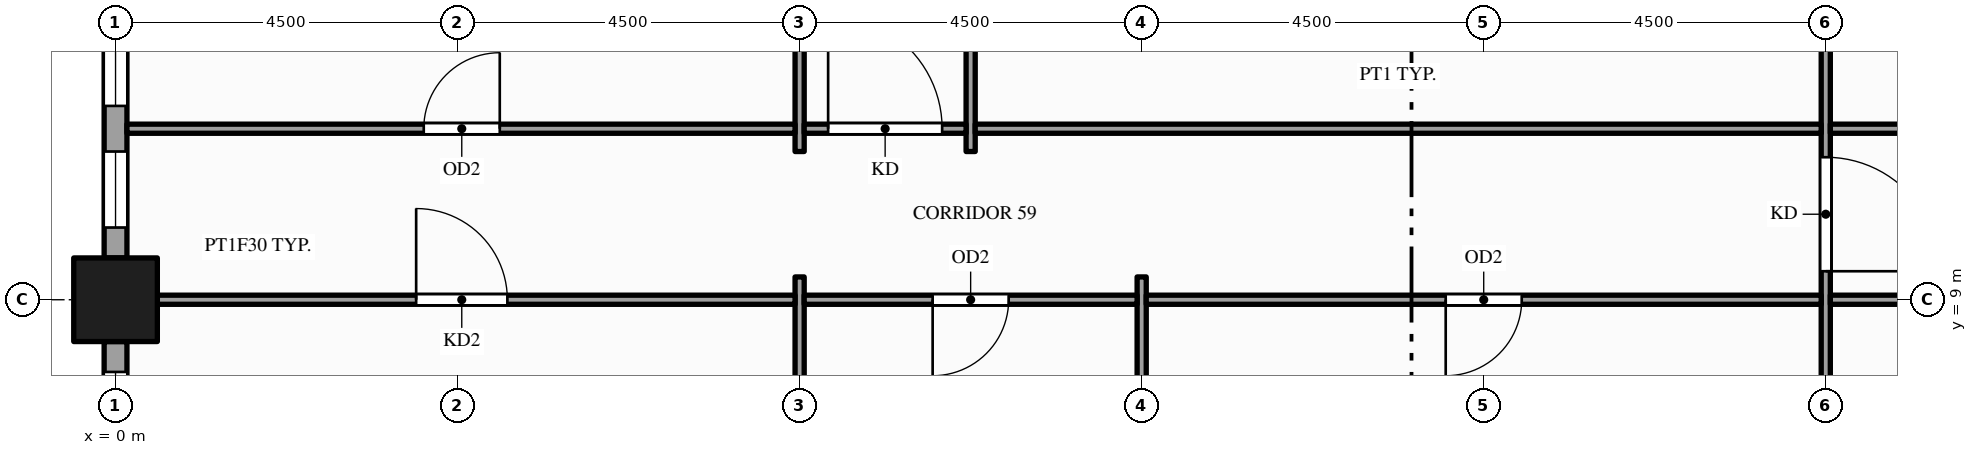
"""IFC4 building model, lengths in metres.
Left out: names, types, materials, properties, quantities, classifications, styles, units other than length and angle.
Written with IfcOpenShell. Run it as: python <this file> out.ifc"""

import sys

from ifc_helpers import new_model, si_unit, direction, frame, frame_2d, origin, origin_2d, place, context, subcontext, project, spatial, rectangle, hollow_rectangle, extrude, element, fill, save


model = new_model("IFC4")
c1 = context("Model", 3, precision=1e-05, world=origin(), true_north=direction((0.0, 1.0)))
c2 = subcontext(c1, "Body", "Model", "MODEL_VIEW")
j1 = project(units=[si_unit("LENGTHUNIT", "METRE"), si_unit("PLANEANGLEUNIT", "RADIAN")], contexts=[c1])
p1 = place(None, origin())
s1 = spatial("IfcSite", under=j1, at=p1, CompositionType="ELEMENT")
p2 = place(p1, origin())
s2 = spatial("IfcBuilding", under=s1, at=p2, CompositionType="ELEMENT")
p3 = place(p2, frame((0.0, 0.0, 24.0)))
s3 = spatial("IfcBuildingStorey", under=s2, at=p3, CompositionType="ELEMENT", Elevation=24.0)
p4 = place(p3, frame((0.0, 9.0, -0.25), z_axis=(0.0, 0.0, 1.0), x_axis=(1.0, 0.0, 0.0)))
e1 = element("IfcColumn", 1, at=p4, inside=s3, PredefinedType="COLUMN", context=c2, shape_type="SweptSolid", body=[
    extrude(hollow_rectangle(XDim=1.1, YDim=1.1, WallThickness=0.06, at=origin_2d()), origin(), (0.0, 0.0, 1.0), 5.1),
])
p5 = place(p3, frame((0.0, 12.95, 0.0), z_axis=(0.0, 0.0, 1.0), x_axis=(0.0, -1.0, 0.0)))
e2 = element("IfcWall", 2, at=p5, inside=s3, PredefinedType="STANDARD", context=c2, shape_type="SweptSolid", body=[
    extrude(rectangle(XDim=3.4, YDim=0.3, at=frame_2d((1.7, 0.0))), origin(), (0.0, 0.0, 1.0), 4.136),
])
p6 = place(p5, frame((0.4, 0.0, 0.9)))
e3 = element("IfcOpeningElement", 3, at=p6, cuts=e2, PredefinedType="OPENING", context=c2, shape_type="SweptSolid", body=[
    extrude(rectangle(XDim=1.0, YDim=3.0, at=frame_2d((0.5, 1.5))), frame((0.0, 0.16, 0.0), z_axis=(0.0, -1.0, 0.0), x_axis=(1.0, 0.0, 0.0)), (0.0, 0.0, 1.0), 0.32),
])
p7 = place(p5, frame((2.0, 0.0, 0.9)))
e4 = element("IfcOpeningElement", 4, at=p7, cuts=e2, PredefinedType="OPENING", context=c2, shape_type="SweptSolid", body=[
    extrude(rectangle(XDim=1.0, YDim=3.0, at=frame_2d((0.5, 1.5))), frame((0.0, 0.16, 0.0), z_axis=(0.0, -1.0, 0.0), x_axis=(1.0, 0.0, 0.0)), (0.0, 0.0, 1.0), 0.32),
])
p8 = place(p3, frame((0.0, 8.45, 0.0), z_axis=(0.0, 0.0, 1.0), x_axis=(0.0, -1.0, 0.0)))
e5 = element("IfcWall", 5, at=p8, inside=s3, PredefinedType="STANDARD", context=c2, shape_type="SweptSolid", body=[
    extrude(rectangle(XDim=3.4, YDim=0.3, at=frame_2d((1.7, 0.0))), origin(), (0.0, 0.0, 1.0), 4.136),
])
p9 = place(p8, frame((0.4, 0.0, 0.9)))
e6 = element("IfcOpeningElement", 6, at=p9, cuts=e5, PredefinedType="OPENING", context=c2, shape_type="SweptSolid", body=[
    extrude(rectangle(XDim=1.0, YDim=3.0, at=frame_2d((0.5, 1.5))), frame((0.0, 0.16, 0.0), z_axis=(0.0, -1.0, 0.0), x_axis=(1.0, 0.0, 0.0)), (0.0, 0.0, 1.0), 0.32),
])
p10 = place(p8, frame((2.0, 0.0, 0.9)))
e7 = element("IfcOpeningElement", 7, at=p10, cuts=e5, PredefinedType="OPENING", context=c2, shape_type="SweptSolid", body=[
    extrude(rectangle(XDim=1.0, YDim=3.0, at=frame_2d((0.5, 1.5))), frame((0.0, 0.16, 0.0), z_axis=(0.0, -1.0, 0.0), x_axis=(1.0, 0.0, 0.0)), (0.0, 0.0, 1.0), 0.32),
])
p11 = place(p3, frame((9.0, 3.875, 0.0), z_axis=(0.0, 0.0, 1.0), x_axis=(0.0, 1.0, 0.0)))
e8 = element("IfcWall", 8, at=p11, inside=s3, PredefinedType="PARTITIONING", context=c2, shape_type="SweptSolid", body=[
    extrude(rectangle(XDim=5.425, YDim=0.12, at=frame_2d((2.712, 0.0))), origin(), (0.0, 0.0, 1.0), 3.938),
])
p12 = place(p3, frame((9.0, 10.95, 0.0), z_axis=(0.0, 0.0, 1.0), x_axis=(0.0, 1.0, 0.0)))
e9 = element("IfcWall", 9, at=p12, inside=s3, PredefinedType="PARTITIONING", context=c2, shape_type="SweptSolid", body=[
    extrude(rectangle(XDim=20.85, YDim=0.12, at=frame_2d((10.425, 0.0))), origin(), (0.0, 0.0, 1.0), 3.6),
])
p13 = place(p12, frame((13.3, 0.0, 0.0)))
e10 = element("IfcOpeningElement", 10, at=p13, cuts=e9, PredefinedType="OPENING", context=c2, shape_type="SweptSolid", body=[
    extrude(rectangle(XDim=1.0, YDim=2.1, at=frame_2d((0.5, 1.05))), frame((0.0, 0.07, 0.0), z_axis=(0.0, -1.0, 0.0), x_axis=(1.0, 0.0, 0.0)), (0.0, 0.0, 1.0), 0.14),
])
p14 = place(p12, frame((17.8, 0.0, 0.0)))
e11 = element("IfcOpeningElement", 11, at=p14, cuts=e9, PredefinedType="OPENING", context=c2, shape_type="SweptSolid", body=[
    extrude(rectangle(XDim=1.0, YDim=2.1, at=frame_2d((0.5, 1.05))), frame((0.0, 0.07, 0.0), z_axis=(0.0, -1.0, 0.0), x_axis=(1.0, 0.0, 0.0)), (0.0, 0.0, 1.0), 0.14),
])
p15 = place(p3, frame((11.25, 10.95, 0.0), z_axis=(0.0, 0.0, 1.0), x_axis=(0.0, 1.0, 0.0)))
e12 = element("IfcWall", 12, at=p15, inside=s3, PredefinedType="PARTITIONING", context=c2, shape_type="SweptSolid", body=[
    extrude(rectangle(XDim=20.85, YDim=0.12, at=frame_2d((10.425, 0.0))), origin(), (0.0, 0.0, 1.0), 3.6),
])
p16 = place(p15, frame((5.425, 0.0, 0.0)))
e13 = element("IfcOpeningElement", 13, at=p16, cuts=e12, PredefinedType="OPENING", context=c2, shape_type="SweptSolid", body=[
    extrude(rectangle(XDim=1.0, YDim=2.1, at=frame_2d((0.5, 1.05))), frame((0.0, 0.07, 0.0), z_axis=(0.0, -1.0, 0.0), x_axis=(1.0, 0.0, 0.0)), (0.0, 0.0, 1.0), 0.14),
])
p17 = place(p15, frame((12.175, 0.0, 0.0)))
e14 = element("IfcOpeningElement", 14, at=p17, cuts=e12, PredefinedType="OPENING", context=c2, shape_type="SweptSolid", body=[
    extrude(rectangle(XDim=1.0, YDim=2.1, at=frame_2d((0.5, 1.05))), frame((0.0, 0.07, 0.0), z_axis=(0.0, -1.0, 0.0), x_axis=(1.0, 0.0, 0.0)), (0.0, 0.0, 1.0), 0.14),
])
p18 = place(p15, frame((14.425, 0.0, 0.0)))
e15 = element("IfcOpeningElement", 15, at=p18, cuts=e12, PredefinedType="OPENING", context=c2, shape_type="SweptSolid", body=[
    extrude(rectangle(XDim=1.0, YDim=2.1, at=frame_2d((0.5, 1.05))), frame((0.0, 0.07, 0.0), z_axis=(0.0, -1.0, 0.0), x_axis=(1.0, 0.0, 0.0)), (0.0, 0.0, 1.0), 0.14),
])
p19 = place(p15, frame((17.8, 0.0, 0.0)))
e16 = element("IfcOpeningElement", 16, at=p19, cuts=e12, PredefinedType="OPENING", context=c2, shape_type="SweptSolid", body=[
    extrude(rectangle(XDim=1.0, YDim=2.1, at=frame_2d((0.5, 1.05))), frame((0.0, 0.07, 0.0), z_axis=(0.0, -1.0, 0.0), x_axis=(1.0, 0.0, 0.0)), (0.0, 0.0, 1.0), 0.14),
])
p20 = place(p3, frame((13.5, 0.15, 0.0), z_axis=(0.0, 0.0, 1.0), x_axis=(0.0, 1.0, 0.0)))
e17 = element("IfcWall", 17, at=p20, inside=s3, PredefinedType="PARTITIONING", context=c2, shape_type="SweptSolid", body=[
    extrude(rectangle(XDim=9.15, YDim=0.12, at=frame_2d((4.575, 0.0))), origin(), (0.0, 0.0, 1.0), 3.938),
])
p21 = place(p3, frame((22.5, 0.15, 0.0), z_axis=(0.0, 0.0, 1.0), x_axis=(0.0, 1.0, 0.0)))
e18 = element("IfcWall", 18, at=p21, inside=s3, PredefinedType="PARTITIONING", context=c2, shape_type="SweptSolid", body=[
    extrude(rectangle(XDim=35.95, YDim=0.12, at=frame_2d((17.975, 0.0))), origin(), (0.0, 0.0, 1.0), 3.3),
])
p22 = place(p21, frame((9.225, 0.0, 0.0)))
e19 = element("IfcOpeningElement", 19, at=p22, cuts=e18, PredefinedType="OPENING", context=c2, shape_type="SweptSolid", body=[
    extrude(rectangle(XDim=1.5, YDim=2.1, at=frame_2d((0.75, 1.05))), frame((0.0, 0.07, 0.0), z_axis=(0.0, -1.0, 0.0), x_axis=(1.0, 0.0, 0.0)), (0.0, 0.0, 1.0), 0.14),
])
p23 = place(p21, frame((32.7, 0.0, 0.0)))
e20 = element("IfcOpeningElement", 20, at=p23, cuts=e18, PredefinedType="OPENING", context=c2, shape_type="SweptSolid", body=[
    extrude(rectangle(XDim=1.8, YDim=2.1, at=frame_2d((0.9, 1.05))), frame((0.0, 0.07, 0.0), z_axis=(0.0, -1.0, 0.0), x_axis=(1.0, 0.0, 0.0)), (0.0, 0.0, 1.0), 0.14),
])
p24 = place(p3, frame((0.15, 9.0, 0.0), z_axis=(0.0, 0.0, 1.0), x_axis=(1.0, 0.0, 0.0)))
e21 = element("IfcWall", 21, at=p24, inside=s3, PredefinedType="PARTITIONING", context=c2, shape_type="SweptSolid", body=[
    extrude(rectangle(XDim=8.79, YDim=0.12, at=frame_2d((4.395, 0.0))), origin(), (0.0, 0.0, 1.0), 3.938),
])
p25 = place(p24, frame((3.805, 0.0, 0.0)))
e22 = element("IfcOpeningElement", 22, at=p25, cuts=e21, PredefinedType="OPENING", context=c2, shape_type="SweptSolid", body=[
    extrude(rectangle(XDim=1.2, YDim=2.1, at=frame_2d((0.6, 1.05))), frame((0.0, 0.07, 0.0), z_axis=(0.0, -1.0, 0.0), x_axis=(1.0, 0.0, 0.0)), (0.0, 0.0, 1.0), 0.14),
])
p26 = place(p3, frame((9.06, 9.0, 0.0), z_axis=(0.0, 0.0, 1.0), x_axis=(1.0, 0.0, 0.0)))
e23 = element("IfcWall", 23, at=p26, inside=s3, PredefinedType="PARTITIONING", context=c2, shape_type="SweptSolid", body=[
    extrude(rectangle(XDim=4.38, YDim=0.12, at=frame_2d((2.19, 0.0))), origin(), (0.0, 0.0, 1.0), 3.938),
])
p27 = place(p26, frame((1.69, 0.0, 0.0)))
e24 = element("IfcOpeningElement", 24, at=p27, cuts=e23, PredefinedType="OPENING", context=c2, shape_type="SweptSolid", body=[
    extrude(rectangle(XDim=1.0, YDim=2.1, at=frame_2d((0.5, 1.05))), frame((0.0, 0.07, 0.0), z_axis=(0.0, -1.0, 0.0), x_axis=(1.0, 0.0, 0.0)), (0.0, 0.0, 1.0), 0.14),
])
p28 = place(p3, frame((13.56, 9.0, 0.0), z_axis=(0.0, 0.0, 1.0), x_axis=(1.0, 0.0, 0.0)))
e25 = element("IfcWall", 25, at=p28, inside=s3, PredefinedType="PARTITIONING", context=c2, shape_type="SweptSolid", body=[
    extrude(rectangle(XDim=8.88, YDim=0.12, at=frame_2d((4.44, 0.0))), origin(), (0.0, 0.0, 1.0), 3.938),
])
p29 = place(p28, frame((3.94, 0.0, 0.0)))
e26 = element("IfcOpeningElement", 26, at=p29, cuts=e25, PredefinedType="OPENING", context=c2, shape_type="SweptSolid", body=[
    extrude(rectangle(XDim=1.0, YDim=2.1, at=frame_2d((0.5, 1.05))), frame((0.0, 0.07, 0.0), z_axis=(0.0, -1.0, 0.0), x_axis=(1.0, 0.0, 0.0)), (0.0, 0.0, 1.0), 0.14),
])
p30 = place(p3, frame((22.56, 9.0, 0.0), z_axis=(0.0, 0.0, 1.0), x_axis=(1.0, 0.0, 0.0)))
e27 = element("IfcWall", 27, at=p30, inside=s3, PredefinedType="PARTITIONING", context=c2, shape_type="SweptSolid", body=[
    extrude(rectangle(XDim=8.88, YDim=0.12, at=frame_2d((4.44, 0.0))), origin(), (0.0, 0.0, 1.0), 3.788),
])
p31 = place(p30, frame((3.84, 0.0, 0.0)))
e28 = element("IfcOpeningElement", 28, at=p31, cuts=e27, PredefinedType="OPENING", context=c2, shape_type="SweptSolid", body=[
    extrude(rectangle(XDim=1.2, YDim=2.1, at=frame_2d((0.6, 1.05))), frame((0.0, 0.07, 0.0), z_axis=(0.0, -1.0, 0.0), x_axis=(1.0, 0.0, 0.0)), (0.0, 0.0, 1.0), 0.14),
])
p32 = place(p3, frame((0.15, 11.25, 0.0), z_axis=(0.0, 0.0, 1.0), x_axis=(1.0, 0.0, 0.0)))
e29 = element("IfcWall", 29, at=p32, inside=s3, PredefinedType="PARTITIONING", context=c2, shape_type="SweptSolid", body=[
    extrude(rectangle(XDim=8.79, YDim=0.12, at=frame_2d((4.395, 0.0))), origin(), (0.0, 0.0, 1.0), 3.938),
])
p33 = place(p32, frame((3.905, 0.0, 0.0)))
e30 = element("IfcOpeningElement", 30, at=p33, cuts=e29, PredefinedType="OPENING", context=c2, shape_type="SweptSolid", body=[
    extrude(rectangle(XDim=1.0, YDim=2.1, at=frame_2d((0.5, 1.05))), frame((0.0, 0.07, 0.0), z_axis=(0.0, -1.0, 0.0), x_axis=(1.0, 0.0, 0.0)), (0.0, 0.0, 1.0), 0.14),
])
p34 = place(p3, frame((9.06, 11.25, 0.0), z_axis=(0.0, 0.0, 1.0), x_axis=(1.0, 0.0, 0.0)))
e31 = element("IfcWall", 31, at=p34, inside=s3, PredefinedType="PARTITIONING", context=c2, shape_type="SweptSolid", body=[
    extrude(rectangle(XDim=2.13, YDim=0.12, at=frame_2d((1.065, 0.0))), origin(), (0.0, 0.0, 1.0), 3.938),
])
p35 = place(p34, frame((0.315, 0.0, 0.0)))
e32 = element("IfcOpeningElement", 32, at=p35, cuts=e31, PredefinedType="OPENING", context=c2, shape_type="SweptSolid", body=[
    extrude(rectangle(XDim=1.5, YDim=2.1, at=frame_2d((0.75, 1.05))), frame((0.0, 0.07, 0.0), z_axis=(0.0, -1.0, 0.0), x_axis=(1.0, 0.0, 0.0)), (0.0, 0.0, 1.0), 0.14),
])
p36 = place(p3, frame((11.31, 11.25, 0.0), z_axis=(0.0, 0.0, 1.0), x_axis=(1.0, 0.0, 0.0)))
e33 = element("IfcWall", 33, at=p36, inside=s3, PredefinedType="PARTITIONING", context=c2, shape_type="SweptSolid", body=[
    extrude(rectangle(XDim=11.13, YDim=0.12, at=frame_2d((5.565, 0.0))), origin(), (0.0, 0.0, 1.0), 3.938),
])
p37 = place(p3, frame((22.56, 11.25, 0.0), z_axis=(0.0, 0.0, 1.0), x_axis=(1.0, 0.0, 0.0)))
e34 = element("IfcWall", 34, at=p37, inside=s3, PredefinedType="PARTITIONING", context=c2, shape_type="SweptSolid", body=[
    extrude(rectangle(XDim=4.38, YDim=0.12, at=frame_2d((2.19, 0.0))), origin(), (0.0, 0.0, 1.0), 3.788),
])
p38 = place(p37, frame((1.69, 0.0, 0.0)))
e35 = element("IfcOpeningElement", 35, at=p38, cuts=e34, PredefinedType="OPENING", context=c2, shape_type="SweptSolid", body=[
    extrude(rectangle(XDim=1.0, YDim=2.1, at=frame_2d((0.5, 1.05))), frame((0.0, 0.07, 0.0), z_axis=(0.0, -1.0, 0.0), x_axis=(1.0, 0.0, 0.0)), (0.0, 0.0, 1.0), 0.14),
])
p39 = place(p6, origin())
e36 = element("IfcWindow", 36, at=p39, inside=s3, PartitioningType="SINGLE_PANEL", PredefinedType="WINDOW", context=c2, shape_type="SweptSolid", body=[
    extrude(rectangle(XDim=1.0, YDim=3.0, at=frame_2d((0.5, 1.5))), frame((0.0, 0.03, 0.0), z_axis=(0.0, -1.0, 0.0), x_axis=(1.0, 0.0, 0.0)), (0.0, 0.0, 1.0), 0.06),
])
fill(e3, e36)
p40 = place(p7, origin())
e37 = element("IfcWindow", 37, at=p40, inside=s3, PartitioningType="SINGLE_PANEL", PredefinedType="WINDOW", context=c2, shape_type="SweptSolid", body=[
    extrude(rectangle(XDim=1.0, YDim=3.0, at=frame_2d((0.5, 1.5))), frame((0.0, 0.03, 0.0), z_axis=(0.0, -1.0, 0.0), x_axis=(1.0, 0.0, 0.0)), (0.0, 0.0, 1.0), 0.06),
])
fill(e4, e37)
p41 = place(p9, origin())
e38 = element("IfcWindow", 38, at=p41, inside=s3, PartitioningType="SINGLE_PANEL", PredefinedType="WINDOW", context=c2, shape_type="SweptSolid", body=[
    extrude(rectangle(XDim=1.0, YDim=3.0, at=frame_2d((0.5, 1.5))), frame((0.0, 0.03, 0.0), z_axis=(0.0, -1.0, 0.0), x_axis=(1.0, 0.0, 0.0)), (0.0, 0.0, 1.0), 0.06),
])
fill(e6, e38)
p42 = place(p25, origin())
e39 = element("IfcDoor", 39, at=p42, inside=s3, OperationType="SINGLE_SWING_LEFT", PredefinedType="DOOR", context=c2, shape_type="SweptSolid", body=[
    extrude(rectangle(XDim=1.2, YDim=2.1, at=frame_2d((0.6, 1.05))), frame((0.0, 0.025, 0.0), z_axis=(0.0, -1.0, 0.0), x_axis=(1.0, 0.0, 0.0)), (0.0, 0.0, 1.0), 0.05),
])
fill(e22, e39)
p43 = place(p22, origin())
e40 = element("IfcDoor", 40, at=p43, inside=s3, OperationType="SINGLE_SWING_LEFT", PredefinedType="DOOR", context=c2, shape_type="SweptSolid", body=[
    extrude(rectangle(XDim=1.5, YDim=2.1, at=frame_2d((0.75, 1.05))), frame((0.0, 0.025, 0.0), z_axis=(0.0, -1.0, 0.0), x_axis=(1.0, 0.0, 0.0)), (0.0, 0.0, 1.0), 0.05),
])
fill(e19, e40)
p44 = place(p27, origin())
e41 = element("IfcDoor", 41, at=p44, inside=s3, OperationType="SINGLE_SWING_LEFT", PredefinedType="DOOR", context=c2, shape_type="SweptSolid", body=[
    extrude(rectangle(XDim=1.0, YDim=2.1, at=frame_2d((0.5, 1.05))), frame((0.0, 0.025, 0.0), z_axis=(0.0, -1.0, 0.0), x_axis=(1.0, 0.0, 0.0)), (0.0, 0.0, 1.0), 0.05),
])
fill(e24, e41)
p45 = place(p29, origin())
e42 = element("IfcDoor", 42, at=p45, inside=s3, OperationType="SINGLE_SWING_LEFT", PredefinedType="DOOR", context=c2, shape_type="SweptSolid", body=[
    extrude(rectangle(XDim=1.0, YDim=2.1, at=frame_2d((0.5, 1.05))), frame((0.0, 0.025, 0.0), z_axis=(0.0, -1.0, 0.0), x_axis=(1.0, 0.0, 0.0)), (0.0, 0.0, 1.0), 0.05),
])
fill(e26, e42)
p46 = place(p35, origin())
e43 = element("IfcDoor", 43, at=p46, inside=s3, OperationType="SINGLE_SWING_LEFT", PredefinedType="DOOR", context=c2, shape_type="SweptSolid", body=[
    extrude(rectangle(XDim=1.5, YDim=2.1, at=frame_2d((0.75, 1.05))), frame((0.0, 0.025, 0.0), z_axis=(0.0, -1.0, 0.0), x_axis=(1.0, 0.0, 0.0)), (0.0, 0.0, 1.0), 0.05),
])
fill(e32, e43)
p47 = place(p33, origin())
e44 = element("IfcDoor", 44, at=p47, inside=s3, OperationType="SINGLE_SWING_RIGHT", PredefinedType="DOOR", context=c2, shape_type="SweptSolid", body=[
    extrude(rectangle(XDim=1.0, YDim=2.1, at=frame_2d((0.5, 1.05))), frame((0.0, 0.025, 0.0), z_axis=(0.0, -1.0, 0.0), x_axis=(1.0, 0.0, 0.0)), (0.0, 0.0, 1.0), 0.05),
])
fill(e30, e44)
save(model, sys.argv[1])
